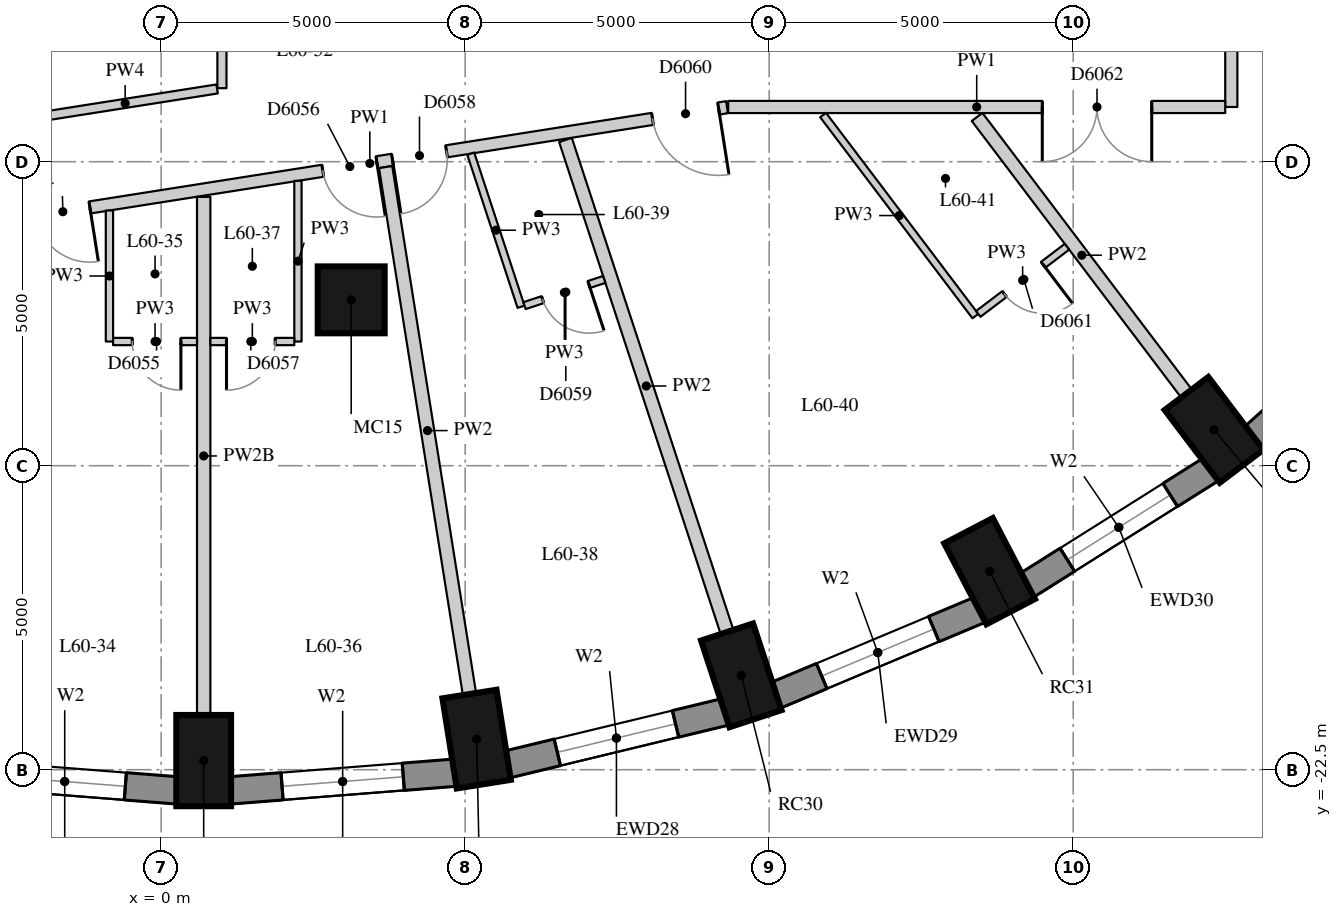
"""IFC4 building model, lengths in metres.
Left out: names, types, materials, properties, quantities, classifications, styles, units other than length and angle.
Written with IfcOpenShell. Run it as: python <this file> out.ifc"""

import sys

from ifc_helpers import new_model, si_unit, direction, frame, frame_2d, origin, origin_2d, place, context, subcontext, project, spatial, rectangle, extrude, element, fill, save


model = new_model("IFC4")
c1 = context("Model", 3, precision=1e-05, world=origin(), true_north=direction((0.0, 1.0)))
c2 = subcontext(c1, "Body", "Model", "MODEL_VIEW")
j1 = project(units=[si_unit("LENGTHUNIT", "METRE"), si_unit("PLANEANGLEUNIT", "RADIAN")], contexts=[c1])
p1 = place(None, origin())
s1 = spatial("IfcSite", under=j1, at=p1, CompositionType="ELEMENT")
p2 = place(p1, origin())
s2 = spatial("IfcBuilding", under=s1, at=p2, CompositionType="ELEMENT")
p3 = place(p2, frame((0.0, 0.0, 212.3)))
s3 = spatial("IfcBuildingStorey", under=s2, at=p3, CompositionType="ELEMENT", Elevation=212.3)
for number, where, z_axis, x_axis in (
    (1, (0.7, -22.35, 0.0), (0.0, 0.0, 1.0), (0.0, -1.0, 0.0)),
    (2, (5.189, -21.997, 0.0), (0.0, 0.0, 1.0), (0.157, -0.988, 0.0)),
    (3, (9.541, -20.948, 0.0), (0.0, 0.0, 1.0), (0.312, -0.95, 0.0)),
    (4, (13.625, -19.235, 0.0), (0.0, 0.0, 1.0), (0.462, -0.887, 0.0)),
    (5, (17.316, -16.911, 0.0), (0.0, 0.0, 1.0), (0.604, -0.797, 0.0)),
):
    element("IfcColumn", number, at=place(p3, frame(where, z_axis=z_axis, x_axis=x_axis)), inside=s3, PredefinedType="COLUMN", context=c2, shape_type="SweptSolid", body=[
        extrude(rectangle(XDim=1.5, YDim=0.9, at=origin_2d()), origin(), (0.0, 0.0, 1.0), 3.3),
    ])
p4 = place(p3, frame((3.126, -14.772, 0.0), z_axis=(0.0, 0.0, 1.0), x_axis=(1.0, 0.0, 0.0)))
e6 = element("IfcColumn", 6, at=p4, inside=s3, PredefinedType="COLUMN", context=c2, shape_type="SweptSolid", body=[
    extrude(rectangle(XDim=1.1, YDim=1.1, at=origin_2d()), origin(), (0.0, 0.0, 1.0), 3.3),
])
p5 = place(p3, frame((-3.441, -22.548, 0.0), z_axis=(0.0, 0.0, 1.0), x_axis=(0.996913971077, -0.078501810629, 0.0)))
e7 = element("IfcWall", 7, at=p5, inside=s3, PredefinedType="SOLIDWALL", context=c2, shape_type="SweptSolid", body=[
    extrude(rectangle(XDim=3.723, YDim=0.45, at=frame_2d((1.861, 0.0))), origin(), (0.0, 0.0, 1.0), 3.02),
])
p6 = place(p5, frame((0.861, 0.0, 0.4)))
e8 = element("IfcOpeningElement", 8, at=p6, cuts=e7, PredefinedType="OPENING", context=c2, shape_type="SweptSolid", body=[
    extrude(rectangle(XDim=2.0, YDim=1.75, at=frame_2d((1.0, 0.875))), frame((0.0, 0.235, 0.0), z_axis=(0.0, -1.0, 0.0), x_axis=(1.0, 0.0, 0.0)), (0.0, 0.0, 1.0), 0.47),
])
p7 = place(p3, frame((1.13, -22.841, 0.0), z_axis=(0.0, 0.0, 1.0), x_axis=(0.996913566885, 0.078506943392, 0.0)))
e9 = element("IfcWall", 9, at=p7, inside=s3, PredefinedType="SOLIDWALL", context=c2, shape_type="SweptSolid", body=[
    extrude(rectangle(XDim=3.722, YDim=0.45, at=frame_2d((1.861, 0.0))), origin(), (0.0, 0.0, 1.0), 3.02),
])
p8 = place(p7, frame((0.861, 0.0, 0.4)))
e10 = element("IfcOpeningElement", 10, at=p8, cuts=e9, PredefinedType="OPENING", context=c2, shape_type="SweptSolid", body=[
    extrude(rectangle(XDim=2.0, YDim=1.75, at=frame_2d((1.0, 0.875))), frame((0.0, 0.235, 0.0), z_axis=(0.0, -1.0, 0.0), x_axis=(1.0, 0.0, 0.0)), (0.0, 0.0, 1.0), 0.47),
])
p9 = place(p3, frame((5.691, -22.414, 0.0), z_axis=(0.0, 0.0, 1.0), x_axis=(0.9721584944, 0.234324266275, 0.0)))
e11 = element("IfcWall", 11, at=p9, inside=s3, PredefinedType="SOLIDWALL", context=c2, shape_type="SweptSolid", body=[
    extrude(rectangle(XDim=3.698, YDim=0.45, at=frame_2d((1.849, 0.0))), origin(), (0.0, 0.0, 1.0), 3.02),
])
p10 = place(p9, frame((0.849, 0.0, 0.4)))
e12 = element("IfcOpeningElement", 12, at=p10, cuts=e11, PredefinedType="OPENING", context=c2, shape_type="SweptSolid", body=[
    extrude(rectangle(XDim=2.0, YDim=1.75, at=frame_2d((1.0, 0.875))), frame((0.0, 0.235, 0.0), z_axis=(0.0, -1.0, 0.0), x_axis=(1.0, 0.0, 0.0)), (0.0, 0.0, 1.0), 0.47),
])
p11 = place(p3, frame((10.103, -21.279, 0.0), z_axis=(0.0, 0.0, 1.0), x_axis=(0.922168222612, 0.386789050006, 0.0)))
e13 = element("IfcWall", 13, at=p11, inside=s3, PredefinedType="SOLIDWALL", context=c2, shape_type="SweptSolid", body=[
    extrude(rectangle(XDim=3.651, YDim=0.45, at=frame_2d((1.825, 0.0))), origin(), (0.0, 0.0, 1.0), 3.02),
])
p12 = place(p11, frame((0.825, 0.0, 0.4)))
e14 = element("IfcOpeningElement", 14, at=p12, cuts=e13, PredefinedType="OPENING", context=c2, shape_type="SweptSolid", body=[
    extrude(rectangle(XDim=2.0, YDim=1.75, at=frame_2d((1.0, 0.875))), frame((0.0, 0.235, 0.0), z_axis=(0.0, -1.0, 0.0), x_axis=(1.0, 0.0, 0.0)), (0.0, 0.0, 1.0), 0.47),
])
p13 = place(p3, frame((14.232, -19.47, 0.0), z_axis=(0.0, 0.0, 1.0), x_axis=(0.84614984472, 0.532945063098, 0.0)))
e15 = element("IfcWall", 15, at=p13, inside=s3, PredefinedType="SOLIDWALL", context=c2, shape_type="SweptSolid", body=[
    extrude(rectangle(XDim=3.586, YDim=0.45, at=frame_2d((1.793, 0.0))), origin(), (0.0, 0.0, 1.0), 3.02),
])
p14 = place(p13, frame((0.793, 0.0, 0.4)))
e16 = element("IfcOpeningElement", 16, at=p14, cuts=e15, PredefinedType="OPENING", context=c2, shape_type="SweptSolid", body=[
    extrude(rectangle(XDim=2.0, YDim=1.75, at=frame_2d((1.0, 0.875))), frame((0.0, 0.235, 0.0), z_axis=(0.0, -1.0, 0.0), x_axis=(1.0, 0.0, 0.0)), (0.0, 0.0, 1.0), 0.47),
])
p15 = place(p3, frame((17.953, -17.04, 0.0), z_axis=(0.0, 0.0, 1.0), x_axis=(0.743442727602, 0.668799604348, 0.0)))
e17 = element("IfcWall", 17, at=p15, inside=s3, PredefinedType="SOLIDWALL", context=c2, shape_type="SweptSolid", body=[
    extrude(rectangle(XDim=3.513, YDim=0.45, at=frame_2d((1.756, 0.0))), origin(), (0.0, 0.0, 1.0), 3.02),
])
p16 = place(p3, frame((17.6, -3.8, 0.0), z_axis=(0.0, 0.0, 1.0), x_axis=(0.0, -1.0, 0.0)))
e18 = element("IfcWall", 18, at=p16, inside=s3, PredefinedType="PARTITIONING", context=c2, shape_type="SweptSolid", body=[
    extrude(rectangle(XDim=7.8, YDim=0.2, at=frame_2d((3.9, 0.0))), origin(), (0.0, 0.0, 1.0), 3.02),
])
p17 = place(p3, frame((17.5, -11.6, 0.0), z_axis=(0.0, 0.0, 1.0), x_axis=(-1.0, 0.0, 0.0)))
e19 = element("IfcWall", 19, at=p17, inside=s3, PredefinedType="PARTITIONING", context=c2, shape_type="SweptSolid", body=[
    extrude(rectangle(XDim=8.174, YDim=0.2, at=frame_2d((4.087, 0.0))), origin(), (0.0, 0.0, 1.0), 3.02),
])
p18 = place(p17, frame((1.208, 0.0, 0.0)))
e20 = element("IfcOpeningElement", 20, at=p18, cuts=e19, PredefinedType="OPENING", context=c2, shape_type="SweptSolid", body=[
    extrude(rectangle(XDim=1.8, YDim=2.1, at=frame_2d((0.9, 1.05))), frame((0.0, 0.11, 0.0), z_axis=(0.0, -1.0, 0.0), x_axis=(1.0, 0.0, 0.0)), (0.0, 0.0, 1.0), 0.22),
])
p19 = place(p3, frame((9.306, -11.603, 0.0), z_axis=(0.0, 0.0, 1.0), x_axis=(-0.987842562114, -0.155457622769, 0.0)))
e21 = element("IfcWall", 21, at=p19, inside=s3, PredefinedType="PARTITIONING", context=c2, shape_type="SweptSolid", body=[
    extrude(rectangle(XDim=11.893, YDim=0.2, at=frame_2d((5.947, 0.0))), origin(), (0.0, 0.0, 1.0), 3.02),
])
p20 = place(p19, frame((10.607, 0.0, 0.0)))
e22 = element("IfcOpeningElement", 22, at=p20, cuts=e21, PredefinedType="OPENING", context=c2, shape_type="SweptSolid", body=[
    extrude(rectangle(XDim=0.9, YDim=2.1, at=frame_2d((0.45, 1.05))), frame((0.0, 0.11, 0.0), z_axis=(0.0, -1.0, 0.0), x_axis=(1.0, 0.0, 0.0)), (0.0, 0.0, 1.0), 0.22),
])
p21 = place(p19, frame((5.829, 0.0, 0.0)))
e23 = element("IfcOpeningElement", 23, at=p21, cuts=e21, PredefinedType="OPENING", context=c2, shape_type="SweptSolid", body=[
    extrude(rectangle(XDim=0.9, YDim=2.1, at=frame_2d((0.45, 1.05))), frame((0.0, 0.11, 0.0), z_axis=(0.0, -1.0, 0.0), x_axis=(1.0, 0.0, 0.0)), (0.0, 0.0, 1.0), 0.22),
])
p22 = place(p19, frame((4.669, 0.0, 0.0)))
e24 = element("IfcOpeningElement", 24, at=p22, cuts=e21, PredefinedType="OPENING", context=c2, shape_type="SweptSolid", body=[
    extrude(rectangle(XDim=0.9, YDim=2.1, at=frame_2d((0.45, 1.05))), frame((0.0, 0.11, 0.0), z_axis=(0.0, -1.0, 0.0), x_axis=(1.0, 0.0, 0.0)), (0.0, 0.0, 1.0), 0.22),
])
p23 = place(p19, frame((0.14, 0.0, 0.0)))
e25 = element("IfcOpeningElement", 25, at=p23, cuts=e21, PredefinedType="OPENING", context=c2, shape_type="SweptSolid", body=[
    extrude(rectangle(XDim=1.1, YDim=2.1, at=frame_2d((0.55, 1.05))), frame((0.0, 0.11, 0.0), z_axis=(0.0, -1.0, 0.0), x_axis=(1.0, 0.0, 0.0)), (0.0, 0.0, 1.0), 0.22),
])
p24 = place(p3, frame((1.0, -9.23, 0.0), z_axis=(0.0, 0.0, 1.0), x_axis=(0.0, -1.0, 0.0)))
e26 = element("IfcWall", 26, at=p24, inside=s3, PredefinedType="PARTITIONING", context=c2, shape_type="SweptSolid", body=[
    extrude(rectangle(XDim=2.061, YDim=0.15, at=frame_2d((1.03, 0.0))), origin(), (0.0, 0.0, 1.0), 3.02),
])
p25 = place(p3, frame((0.921, -11.303, 0.0), z_axis=(0.0, 0.0, 1.0), x_axis=(-0.987854584084, -0.15538121091, 0.0)))
e27 = element("IfcWall", 27, at=p25, inside=s3, PredefinedType="PARTITIONING", context=c2, shape_type="SweptSolid", body=[
    extrude(rectangle(XDim=3.062, YDim=0.15, at=frame_2d((1.531, 0.0))), origin(), (0.0, 0.0, 1.0), 3.02),
])
p26 = place(p3, frame((0.7, -21.6, 0.0), z_axis=(0.0, 0.0, 1.0), x_axis=(0.0, 1.0, 0.0)))
e28 = element("IfcWall", 28, at=p26, inside=s3, PredefinedType="PARTITIONING", context=c2, shape_type="SweptSolid", body=[
    extrude(rectangle(XDim=8.521, YDim=0.22, at=frame_2d((4.261, 0.0))), origin(), (0.0, 0.0, 1.0), 2.57),
])
p27 = place(p3, frame((5.071, -21.256, 0.0), z_axis=(0.0, 0.0, 1.0), x_axis=(-0.157132312818, 0.987577559622, 0.0)))
e29 = element("IfcWall", 29, at=p27, inside=s3, PredefinedType="PARTITIONING", context=c2, shape_type="SweptSolid", body=[
    extrude(rectangle(XDim=8.777, YDim=0.22, at=frame_2d((4.389, 0.0))), origin(), (0.0, 0.0, 1.0), 3.02),
])
p28 = place(p3, frame((9.307, -20.235, 0.0), z_axis=(0.0, 0.0, 1.0), x_axis=(-0.311959631661, 0.950095357432, 0.0)))
e30 = element("IfcWall", 30, at=p28, inside=s3, PredefinedType="PARTITIONING", context=c2, shape_type="SweptSolid", body=[
    extrude(rectangle(XDim=8.518, YDim=0.22, at=frame_2d((4.259, 0.0))), origin(), (0.0, 0.0, 1.0), 3.02),
])
p29 = place(p3, frame((16.863, -16.312, 0.0), z_axis=(0.0, 0.0, 1.0), x_axis=(-0.603636051313, 0.797260006243, 0.0)))
e31 = element("IfcWall", 31, at=p29, inside=s3, PredefinedType="PARTITIONING", context=c2, shape_type="SweptSolid", body=[
    extrude(rectangle(XDim=5.706, YDim=0.22, at=frame_2d((2.853, 0.0))), origin(), (0.0, 0.0, 1.0), 3.02),
])
p30 = place(p3, frame((-0.85, -13.303, 0.0), z_axis=(0.0, 0.0, 1.0), x_axis=(0.0, -1.0, 0.0)))
e32 = element("IfcWall", 32, at=p30, inside=s3, PredefinedType="PARTITIONING", context=c2, shape_type="SweptSolid", body=[
    extrude(rectangle(XDim=2.155, YDim=0.12, at=frame_2d((1.077, 0.0))), origin(), (0.0, 0.0, 1.0), 3.02),
])
p31 = place(p3, frame((2.25, -12.815, 0.0), z_axis=(0.0, 0.0, 1.0), x_axis=(0.0, -1.0, 0.0)))
e33 = element("IfcWall", 33, at=p31, inside=s3, PredefinedType="PARTITIONING", context=c2, shape_type="SweptSolid", body=[
    extrude(rectangle(XDim=2.643, YDim=0.12, at=frame_2d((1.321, 0.0))), origin(), (0.0, 0.0, 1.0), 3.02),
])
p32 = place(p3, frame((5.092, -12.368, 0.0), z_axis=(0.0, 0.0, 1.0), x_axis=(0.311969203188, -0.95009221461, 0.0)))
e34 = element("IfcWall", 34, at=p32, inside=s3, PredefinedType="PARTITIONING", context=c2, shape_type="SweptSolid", body=[
    extrude(rectangle(XDim=2.651, YDim=0.12, at=frame_2d((1.325, 0.0))), origin(), (0.0, 0.0, 1.0), 3.02),
])
p33 = place(p3, frame((10.887, -11.732, 0.0), z_axis=(0.0, 0.0, 1.0), x_axis=(0.603646932038, -0.797251767913, 0.0)))
e35 = element("IfcWall", 35, at=p33, inside=s3, PredefinedType="PARTITIONING", context=c2, shape_type="SweptSolid", body=[
    extrude(rectangle(XDim=4.149, YDim=0.12, at=frame_2d((2.074, 0.0))), origin(), (0.0, 0.0, 1.0), 3.02),
])
p34 = place(p3, frame((-0.79, -15.458, 0.0), z_axis=(0.0, 0.0, 1.0), x_axis=(1.0, 0.0, 0.0)))
e36 = element("IfcWall", 36, at=p34, inside=s3, PredefinedType="PARTITIONING", context=c2, shape_type="SweptSolid", body=[
    extrude(rectangle(XDim=1.38, YDim=0.12, at=frame_2d((0.69, 0.0))), origin(), (0.0, 0.0, 1.0), 3.02),
])
p35 = place(p34, frame((0.315, 0.0, 0.0)))
e37 = element("IfcOpeningElement", 37, at=p35, cuts=e36, PredefinedType="OPENING", context=c2, shape_type="SweptSolid", body=[
    extrude(rectangle(XDim=0.8, YDim=2.1, at=frame_2d((0.4, 1.05))), frame((0.0, 0.07, 0.0), z_axis=(0.0, -1.0, 0.0), x_axis=(1.0, 0.0, 0.0)), (0.0, 0.0, 1.0), 0.14),
])
p36 = place(p3, frame((2.19, -15.458, 0.0), z_axis=(0.0, 0.0, 1.0), x_axis=(-1.0, 0.0, 0.0)))
e38 = element("IfcWall", 38, at=p36, inside=s3, PredefinedType="PARTITIONING", context=c2, shape_type="SweptSolid", body=[
    extrude(rectangle(XDim=1.38, YDim=0.12, at=frame_2d((0.69, 0.0))), origin(), (0.0, 0.0, 1.0), 3.02),
])
p37 = place(p36, frame((0.315, 0.0, 0.0)))
e39 = element("IfcOpeningElement", 39, at=p37, cuts=e38, PredefinedType="OPENING", context=c2, shape_type="SweptSolid", body=[
    extrude(rectangle(XDim=0.8, YDim=2.1, at=frame_2d((0.4, 1.05))), frame((0.0, 0.07, 0.0), z_axis=(0.0, -1.0, 0.0), x_axis=(1.0, 0.0, 0.0)), (0.0, 0.0, 1.0), 0.14),
])
p38 = place(p3, frame((5.976, -14.867, 0.0), z_axis=(0.0, 0.0, 1.0), x_axis=(0.950123887932, 0.311872726573, 0.0)))
e40 = element("IfcWall", 40, at=p38, inside=s3, PredefinedType="PARTITIONING", context=c2, shape_type="SweptSolid", body=[
    extrude(rectangle(XDim=1.38, YDim=0.12, at=frame_2d((0.69, 0.0))), origin(), (0.0, 0.0, 1.0), 3.02),
])
p39 = place(p38, frame((0.315, 0.0, 0.0)))
e41 = element("IfcOpeningElement", 41, at=p39, cuts=e40, PredefinedType="OPENING", context=c2, shape_type="SweptSolid", body=[
    extrude(rectangle(XDim=0.8, YDim=2.1, at=frame_2d((0.4, 1.05))), frame((0.0, 0.07, 0.0), z_axis=(0.0, -1.0, 0.0), x_axis=(1.0, 0.0, 0.0)), (0.0, 0.0, 1.0), 0.14),
])
p40 = place(p3, frame((13.439, -15.003, 0.0), z_axis=(0.0, 0.0, 1.0), x_axis=(0.797238062708, 0.603665032422, 0.0)))
e42 = element("IfcWall", 42, at=p40, inside=s3, PredefinedType="PARTITIONING", context=c2, shape_type="SweptSolid", body=[
    extrude(rectangle(XDim=1.83, YDim=0.12, at=frame_2d((0.915, 0.0))), origin(), (0.0, 0.0, 1.0), 3.02),
])
p41 = place(p40, frame((0.54, 0.0, 0.0)))
e43 = element("IfcOpeningElement", 43, at=p41, cuts=e42, PredefinedType="OPENING", context=c2, shape_type="SweptSolid", body=[
    extrude(rectangle(XDim=0.8, YDim=2.1, at=frame_2d((0.4, 1.05))), frame((0.0, 0.07, 0.0), z_axis=(0.0, -1.0, 0.0), x_axis=(1.0, 0.0, 0.0)), (0.0, 0.0, 1.0), 0.14),
])
p42 = place(p6, origin())
e44 = element("IfcWindow", 44, at=p42, inside=s3, PartitioningType="SINGLE_PANEL", PredefinedType="WINDOW", context=c2, shape_type="SweptSolid", body=[
    extrude(rectangle(XDim=2.0, YDim=1.75, at=frame_2d((1.0, 0.875))), frame((0.0, 0.035, 0.0), z_axis=(0.0, -1.0, 0.0), x_axis=(1.0, 0.0, 0.0)), (0.0, 0.0, 1.0), 0.06),
])
fill(e8, e44)
p43 = place(p8, origin())
e45 = element("IfcWindow", 45, at=p43, inside=s3, PartitioningType="SINGLE_PANEL", PredefinedType="WINDOW", context=c2, shape_type="SweptSolid", body=[
    extrude(rectangle(XDim=2.0, YDim=1.75, at=frame_2d((1.0, 0.875))), frame((0.0, 0.035, 0.0), z_axis=(0.0, -1.0, 0.0), x_axis=(1.0, 0.0, 0.0)), (0.0, 0.0, 1.0), 0.06),
])
fill(e10, e45)
p44 = place(p10, origin())
e46 = element("IfcWindow", 46, at=p44, inside=s3, PartitioningType="SINGLE_PANEL", PredefinedType="WINDOW", context=c2, shape_type="SweptSolid", body=[
    extrude(rectangle(XDim=2.0, YDim=1.75, at=frame_2d((1.0, 0.875))), frame((0.0, 0.035, 0.0), z_axis=(0.0, -1.0, 0.0), x_axis=(1.0, 0.0, 0.0)), (0.0, 0.0, 1.0), 0.06),
])
fill(e12, e46)
p45 = place(p12, origin())
e47 = element("IfcWindow", 47, at=p45, inside=s3, PartitioningType="SINGLE_PANEL", PredefinedType="WINDOW", context=c2, shape_type="SweptSolid", body=[
    extrude(rectangle(XDim=2.0, YDim=1.75, at=frame_2d((1.0, 0.875))), frame((0.0, 0.035, 0.0), z_axis=(0.0, -1.0, 0.0), x_axis=(1.0, 0.0, 0.0)), (0.0, 0.0, 1.0), 0.06),
])
fill(e14, e47)
p46 = place(p14, origin())
e48 = element("IfcWindow", 48, at=p46, inside=s3, PartitioningType="SINGLE_PANEL", PredefinedType="WINDOW", context=c2, shape_type="SweptSolid", body=[
    extrude(rectangle(XDim=2.0, YDim=1.75, at=frame_2d((1.0, 0.875))), frame((0.0, 0.035, 0.0), z_axis=(0.0, -1.0, 0.0), x_axis=(1.0, 0.0, 0.0)), (0.0, 0.0, 1.0), 0.06),
])
fill(e16, e48)
p47 = place(p20, origin())
e49 = element("IfcDoor", 49, at=p47, inside=s3, OperationType="SINGLE_SWING_LEFT", PredefinedType="DOOR", context=c2, shape_type="SweptSolid", body=[
    extrude(rectangle(XDim=0.9, YDim=2.1, at=frame_2d((0.45, 1.05))), frame((0.0, 0.025, 0.0), z_axis=(0.0, -1.0, 0.0), x_axis=(1.0, 0.0, 0.0)), (0.0, 0.0, 1.0), 0.05),
])
fill(e22, e49)
p48 = place(p35, origin())
e50 = element("IfcDoor", 50, at=p48, inside=s3, OperationType="SINGLE_SWING_LEFT", PredefinedType="DOOR", context=c2, shape_type="SweptSolid", body=[
    extrude(rectangle(XDim=0.8, YDim=2.1, at=frame_2d((0.4, 1.05))), frame((0.0, 0.025, 0.0), z_axis=(0.0, -1.0, 0.0), x_axis=(1.0, 0.0, 0.0)), (0.0, 0.0, 1.0), 0.05),
])
fill(e37, e50)
p49 = place(p21, origin())
e51 = element("IfcDoor", 51, at=p49, inside=s3, OperationType="SINGLE_SWING_LEFT", PredefinedType="DOOR", context=c2, shape_type="SweptSolid", body=[
    extrude(rectangle(XDim=0.9, YDim=2.1, at=frame_2d((0.45, 1.05))), frame((0.0, 0.025, 0.0), z_axis=(0.0, -1.0, 0.0), x_axis=(1.0, 0.0, 0.0)), (0.0, 0.0, 1.0), 0.05),
])
fill(e23, e51)
p50 = place(p37, origin())
e52 = element("IfcDoor", 52, at=p50, inside=s3, OperationType="SINGLE_SWING_RIGHT", PredefinedType="DOOR", context=c2, shape_type="SweptSolid", body=[
    extrude(rectangle(XDim=0.8, YDim=2.1, at=frame_2d((0.4, 1.05))), frame((0.0, 0.025, 0.0), z_axis=(0.0, -1.0, 0.0), x_axis=(1.0, 0.0, 0.0)), (0.0, 0.0, 1.0), 0.05),
])
fill(e39, e52)
p51 = place(p22, origin())
e53 = element("IfcDoor", 53, at=p51, inside=s3, OperationType="SINGLE_SWING_RIGHT", PredefinedType="DOOR", context=c2, shape_type="SweptSolid", body=[
    extrude(rectangle(XDim=0.9, YDim=2.1, at=frame_2d((0.45, 1.05))), frame((0.0, 0.025, 0.0), z_axis=(0.0, -1.0, 0.0), x_axis=(1.0, 0.0, 0.0)), (0.0, 0.0, 1.0), 0.05),
])
fill(e24, e53)
p52 = place(p39, origin())
e54 = element("IfcDoor", 54, at=p52, inside=s3, OperationType="SINGLE_SWING_LEFT", PredefinedType="DOOR", context=c2, shape_type="SweptSolid", body=[
    extrude(rectangle(XDim=0.8, YDim=2.1, at=frame_2d((0.4, 1.05))), frame((0.0, 0.025, 0.0), z_axis=(0.0, -1.0, 0.0), x_axis=(1.0, 0.0, 0.0)), (0.0, 0.0, 1.0), 0.05),
])
fill(e41, e54)
p53 = place(p23, origin())
e55 = element("IfcDoor", 55, at=p53, inside=s3, OperationType="SINGLE_SWING_LEFT", PredefinedType="DOOR", context=c2, shape_type="SweptSolid", body=[
    extrude(rectangle(XDim=1.1, YDim=2.1, at=frame_2d((0.55, 1.05))), frame((0.0, 0.025, 0.0), z_axis=(0.0, -1.0, 0.0), x_axis=(1.0, 0.0, 0.0)), (0.0, 0.0, 1.0), 0.05),
])
fill(e25, e55)
p54 = place(p41, origin())
e56 = element("IfcDoor", 56, at=p54, inside=s3, OperationType="SINGLE_SWING_LEFT", PredefinedType="DOOR", context=c2, shape_type="SweptSolid", body=[
    extrude(rectangle(XDim=0.8, YDim=2.1, at=frame_2d((0.4, 1.05))), frame((0.0, 0.025, 0.0), z_axis=(0.0, -1.0, 0.0), x_axis=(1.0, 0.0, 0.0)), (0.0, 0.0, 1.0), 0.05),
])
fill(e43, e56)
p55 = place(p18, origin())
e57 = element("IfcDoor", 57, at=p55, inside=s3, OperationType="DOUBLE_DOOR_SINGLE_SWING", PredefinedType="DOOR", context=c2, shape_type="SweptSolid", body=[
    extrude(rectangle(XDim=1.8, YDim=2.1, at=frame_2d((0.9, 1.05))), frame((0.0, 0.025, 0.0), z_axis=(0.0, -1.0, 0.0), x_axis=(1.0, 0.0, 0.0)), (0.0, 0.0, 1.0), 0.05),
])
fill(e20, e57)
save(model, sys.argv[1])
